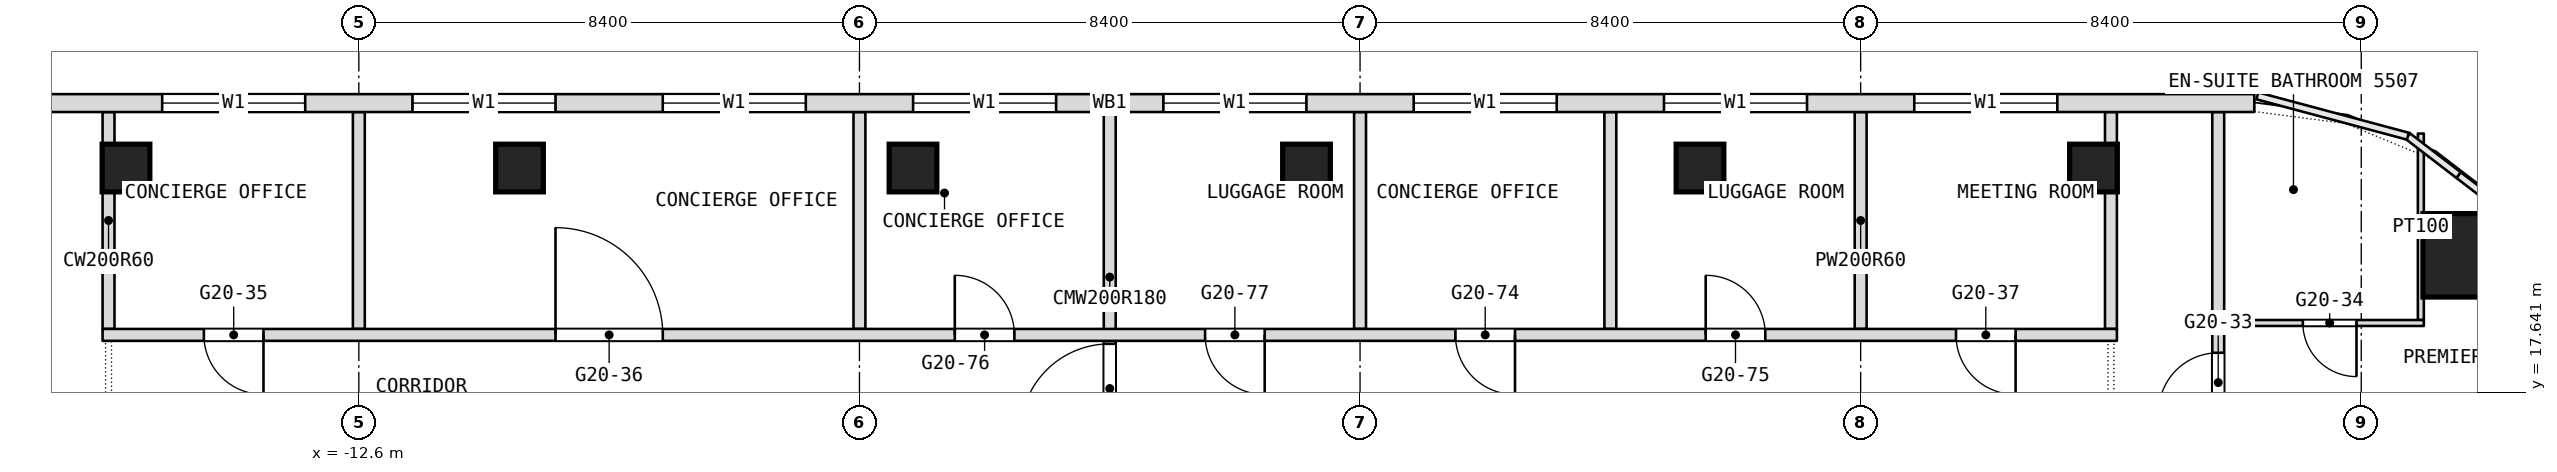
"""IFC4 building model, lengths in metres.
Left out: names, types, materials, properties, quantities, classifications, styles, units other than length and angle.
Written with IfcOpenShell. Run it as: python <this file> out.ifc"""

import sys

from ifc_helpers import new_model, si_unit, direction, frame, frame_2d, origin, origin_2d, place, context, subcontext, project, spatial, rectangle, extrude, element, fill, save


model = new_model("IFC4")
c1 = context("Model", 3, precision=1e-05, world=origin(), true_north=direction((0.0, 1.0)))
c2 = subcontext(c1, "Body", "Model", "MODEL_VIEW")
j1 = project(units=[si_unit("LENGTHUNIT", "METRE"), si_unit("PLANEANGLEUNIT", "RADIAN")], contexts=[c1])
p1 = place(None, origin())
s1 = spatial("IfcSite", under=j1, at=p1, CompositionType="ELEMENT")
p2 = place(p1, origin())
s2 = spatial("IfcBuilding", under=s1, at=p2, CompositionType="ELEMENT")
p3 = place(p2, frame((0.0, 0.0, 234.5)))
s3 = spatial("IfcBuildingStorey", under=s2, at=p3, CompositionType="ELEMENT", Elevation=234.5)
p4 = place(p3, frame((22.736, 19.936, 0.0), z_axis=(0.0, 0.0, 1.0), x_axis=(1.0, 0.0, 0.0)))
e1 = element("IfcColumn", 1, at=p4, inside=s3, PredefinedType="COLUMN", context=c2, shape_type="SweptSolid", body=[
    extrude(rectangle(XDim=1.4, YDim=1.4, at=origin_2d()), origin(), (0.0, 0.0, 1.0), 3.6),
])
for number, where, z_axis, x_axis in (
    (2, (-16.507, 21.4, 0.0), (0.0, 0.0, 1.0), (1.0, 0.0, 0.0)),
    (3, (-9.904, 21.4, 0.0), (0.0, 0.0, 1.0), (1.0, 0.0, 0.0)),
    (4, (-3.302, 21.4, 0.0), (0.0, 0.0, 1.0), (1.0, 0.0, 0.0)),
    (5, (3.302, 21.4, 0.0), (0.0, 0.0, 1.0), (1.0, 0.0, 0.0)),
    (6, (9.904, 21.4, 0.0), (0.0, 0.0, 1.0), (1.0, 0.0, 0.0)),
    (7, (16.507, 21.4, 0.0), (0.0, 0.0, 1.0), (1.0, 0.0, 0.0)),
):
    element("IfcColumn", number, at=place(p3, frame(where, z_axis=z_axis, x_axis=x_axis)), inside=s3, PredefinedType="COLUMN", context=c2, shape_type="SweptSolid", body=[
        extrude(rectangle(XDim=0.8, YDim=0.8, at=origin_2d()), origin(), (0.0, 0.0, 1.0), 3.6),
    ])
p5 = place(p3, frame((22.0, 18.85, 0.0), z_axis=(0.0, 0.0, 1.0), x_axis=(0.0, 1.0, 0.0)))
e8 = element("IfcWall", 8, at=p5, inside=s3, PredefinedType="PARTITIONING", context=c2, shape_type="SweptSolid", body=[
    extrude(rectangle(XDim=3.129, YDim=0.1, at=frame_2d((1.564, 0.0))), origin(), (0.0, 0.0, 1.0), 3.34),
])
p6 = place(p3, frame((18.6, -26.751, 0.0), z_axis=(0.0, 0.0, 1.0), x_axis=(0.0, 1.0, 0.0)))
e9 = element("IfcWall", 9, at=p6, inside=s3, PredefinedType="PARTITIONING", context=c2, shape_type="SweptSolid", body=[
    extrude(rectangle(XDim=49.091, YDim=0.2, at=frame_2d((24.545, 0.0))), origin(), (0.0, 0.0, 1.0), 3.34),
])
p7 = place(p6, frame((6.988, 0.0, 0.0)))
e10 = element("IfcOpeningElement", 10, at=p7, cuts=e9, PredefinedType="OPENING", context=c2, shape_type="SweptSolid", body=[
    extrude(rectangle(XDim=1.1, YDim=2.1, at=frame_2d((0.55, 1.05))), frame((0.0, 0.1, 0.0), z_axis=(0.0, -1.0, 0.0), x_axis=(1.0, 0.0, 0.0)), (0.0, 0.0, 1.0), 0.2),
])
p8 = place(p6, frame((13.551, 0.0, 0.0)))
e11 = element("IfcOpeningElement", 11, at=p8, cuts=e9, PredefinedType="OPENING", context=c2, shape_type="SweptSolid", body=[
    extrude(rectangle(XDim=1.1, YDim=2.1, at=frame_2d((0.55, 1.05))), frame((0.0, 0.1, 0.0), z_axis=(0.0, -1.0, 0.0), x_axis=(1.0, 0.0, 0.0)), (0.0, 0.0, 1.0), 0.2),
])
p9 = place(p6, frame((22.051, 0.0, 0.0)))
e12 = element("IfcOpeningElement", 12, at=p9, cuts=e9, PredefinedType="OPENING", context=c2, shape_type="SweptSolid", body=[
    extrude(rectangle(XDim=1.1, YDim=2.1, at=frame_2d((0.55, 1.05))), frame((0.0, 0.1, 0.0), z_axis=(0.0, -1.0, 0.0), x_axis=(1.0, 0.0, 0.0)), (0.0, 0.0, 1.0), 0.2),
])
p10 = place(p6, frame((28.301, 0.0, 0.0)))
e13 = element("IfcOpeningElement", 13, at=p10, cuts=e9, PredefinedType="OPENING", context=c2, shape_type="SweptSolid", body=[
    extrude(rectangle(XDim=1.1, YDim=2.1, at=frame_2d((0.55, 1.05))), frame((0.0, 0.1, 0.0), z_axis=(0.0, -1.0, 0.0), x_axis=(1.0, 0.0, 0.0)), (0.0, 0.0, 1.0), 0.2),
])
p11 = place(p6, frame((37.951, 0.0, 0.0)))
e14 = element("IfcOpeningElement", 14, at=p11, cuts=e9, PredefinedType="OPENING", context=c2, shape_type="SweptSolid", body=[
    extrude(rectangle(XDim=1.0, YDim=2.1, at=frame_2d((0.5, 1.05))), frame((0.0, 0.1, 0.0), z_axis=(0.0, -1.0, 0.0), x_axis=(1.0, 0.0, 0.0)), (0.0, 0.0, 1.0), 0.2),
])
p12 = place(p6, frame((39.751, 0.0, 0.0)))
e15 = element("IfcOpeningElement", 15, at=p12, cuts=e9, PredefinedType="OPENING", context=c2, shape_type="SweptSolid", body=[
    extrude(rectangle(XDim=1.0, YDim=2.1, at=frame_2d((0.5, 1.05))), frame((0.0, 0.1, 0.0), z_axis=(0.0, -1.0, 0.0), x_axis=(1.0, 0.0, 0.0)), (0.0, 0.0, 1.0), 0.2),
])
p13 = place(p6, frame((44.051, 0.0, 0.0)))
e16 = element("IfcOpeningElement", 16, at=p13, cuts=e9, PredefinedType="OPENING", context=c2, shape_type="SweptSolid", body=[
    extrude(rectangle(XDim=1.0, YDim=2.1, at=frame_2d((0.5, 1.05))), frame((0.0, 0.1, 0.0), z_axis=(0.0, -1.0, 0.0), x_axis=(1.0, 0.0, 0.0)), (0.0, 0.0, 1.0), 0.2),
])
for number, where, z_axis, x_axis in (
    (17, (16.8, 18.7, 0.0), (0.0, 0.0, 1.0), (0.0, 1.0, 0.0)),
    (18, (12.6, 18.7, 0.0), (0.0, 0.0, 1.0), (0.0, 1.0, 0.0)),
    (19, (8.4, 18.7, 0.0), (0.0, 0.0, 1.0), (0.0, 1.0, 0.0)),
    (20, (4.2, 18.7, 0.0), (0.0, 0.0, 1.0), (0.0, 1.0, 0.0)),
):
    element("IfcWall", number, at=place(p3, frame(where, z_axis=z_axis, x_axis=x_axis)), inside=s3, PredefinedType="PARTITIONING", context=c2, shape_type="SweptSolid", body=[
        extrude(rectangle(XDim=3.64, YDim=0.2, at=frame_2d((1.82, 0.0))), origin(), (0.0, 0.0, 1.0), 3.34),
    ])
p14 = place(p3, frame((0.0, 16.8, 0.0), z_axis=(0.0, 0.0, 1.0), x_axis=(0.0, 1.0, 0.0)))
e21 = element("IfcWall", 21, at=p14, inside=s3, PredefinedType="PARTITIONING", context=c2, shape_type="SweptSolid", body=[
    extrude(rectangle(XDim=5.54, YDim=0.2, at=frame_2d((2.77, 0.0))), origin(), (0.0, 0.0, 1.0), 3.34),
])
p15 = place(p14, frame((0.15, 0.0, 0.0)))
e22 = element("IfcOpeningElement", 22, at=p15, cuts=e21, PredefinedType="OPENING", context=c2, shape_type="SweptSolid", body=[
    extrude(rectangle(XDim=1.5, YDim=2.1, at=frame_2d((0.75, 1.05))), frame((0.0, 0.1, 0.0), z_axis=(0.0, -1.0, 0.0), x_axis=(1.0, 0.0, 0.0)), (0.0, 0.0, 1.0), 0.2),
])
for number, where, z_axis, x_axis in (
    (23, (-4.2, 18.7, 0.0), (0.0, 0.0, 1.0), (0.0, 1.0, 0.0)),
    (24, (-12.6, 18.7, 0.0), (0.0, 0.0, 1.0), (0.0, 1.0, 0.0)),
    (25, (-16.8, 18.7, 0.0), (0.0, 0.0, 1.0), (0.0, 1.0, 0.0)),
):
    element("IfcWall", number, at=place(p3, frame(where, z_axis=z_axis, x_axis=x_axis)), inside=s3, PredefinedType="PARTITIONING", context=c2, shape_type="SweptSolid", body=[
        extrude(rectangle(XDim=3.64, YDim=0.2, at=frame_2d((1.82, 0.0))), origin(), (0.0, 0.0, 1.0), 3.34),
    ])
p16 = place(p3, frame((-16.9, 18.6, 0.0), z_axis=(0.0, 0.0, 1.0), x_axis=(1.0, 0.0, 0.0)))
e26 = element("IfcWall", 26, at=p16, inside=s3, PredefinedType="PARTITIONING", context=c2, shape_type="SweptSolid", body=[
    extrude(rectangle(XDim=33.8, YDim=0.2, at=frame_2d((16.9, 0.0))), origin(), (0.0, 0.0, 1.0), 3.34),
])
p17 = place(p16, frame((1.7, 0.0, 0.0)))
e27 = element("IfcOpeningElement", 27, at=p17, cuts=e26, PredefinedType="OPENING", context=c2, shape_type="SweptSolid", body=[
    extrude(rectangle(XDim=1.0, YDim=2.1, at=frame_2d((0.5, 1.05))), frame((0.0, 0.1, 0.0), z_axis=(0.0, -1.0, 0.0), x_axis=(1.0, 0.0, 0.0)), (0.0, 0.0, 1.0), 0.2),
])
p18 = place(p16, frame((7.6, 0.0, 0.0)))
e28 = element("IfcOpeningElement", 28, at=p18, cuts=e26, PredefinedType="OPENING", context=c2, shape_type="SweptSolid", body=[
    extrude(rectangle(XDim=1.8, YDim=2.1, at=frame_2d((0.9, 1.05))), frame((0.0, 0.1, 0.0), z_axis=(0.0, -1.0, 0.0), x_axis=(1.0, 0.0, 0.0)), (0.0, 0.0, 1.0), 0.2),
])
p19 = place(p16, frame((31.1, 0.0, 0.0)))
e29 = element("IfcOpeningElement", 29, at=p19, cuts=e26, PredefinedType="OPENING", context=c2, shape_type="SweptSolid", body=[
    extrude(rectangle(XDim=1.0, YDim=2.1, at=frame_2d((0.5, 1.05))), frame((0.0, 0.1, 0.0), z_axis=(0.0, -1.0, 0.0), x_axis=(1.0, 0.0, 0.0)), (0.0, 0.0, 1.0), 0.2),
])
p20 = place(p16, frame((22.7, 0.0, 0.0)))
e30 = element("IfcOpeningElement", 30, at=p20, cuts=e26, PredefinedType="OPENING", context=c2, shape_type="SweptSolid", body=[
    extrude(rectangle(XDim=1.0, YDim=2.1, at=frame_2d((0.5, 1.05))), frame((0.0, 0.1, 0.0), z_axis=(0.0, -1.0, 0.0), x_axis=(1.0, 0.0, 0.0)), (0.0, 0.0, 1.0), 0.2),
])
p21 = place(p16, frame((26.9, 0.0, 0.0)))
e31 = element("IfcOpeningElement", 31, at=p21, cuts=e26, PredefinedType="OPENING", context=c2, shape_type="SweptSolid", body=[
    extrude(rectangle(XDim=1.0, YDim=2.1, at=frame_2d((0.5, 1.05))), frame((0.0, 0.1, 0.0), z_axis=(0.0, -1.0, 0.0), x_axis=(1.0, 0.0, 0.0)), (0.0, 0.0, 1.0), 0.2),
])
p22 = place(p16, frame((14.3, 0.0, 0.0)))
e32 = element("IfcOpeningElement", 32, at=p22, cuts=e26, PredefinedType="OPENING", context=c2, shape_type="SweptSolid", body=[
    extrude(rectangle(XDim=1.0, YDim=2.1, at=frame_2d((0.5, 1.05))), frame((0.0, 0.1, 0.0), z_axis=(0.0, -1.0, 0.0), x_axis=(1.0, 0.0, 0.0)), (0.0, 0.0, 1.0), 0.2),
])
p23 = place(p16, frame((18.5, 0.0, 0.0)))
e33 = element("IfcOpeningElement", 33, at=p23, cuts=e26, PredefinedType="OPENING", context=c2, shape_type="SweptSolid", body=[
    extrude(rectangle(XDim=1.0, YDim=2.1, at=frame_2d((0.5, 1.05))), frame((0.0, 0.1, 0.0), z_axis=(0.0, -1.0, 0.0), x_axis=(1.0, 0.0, 0.0)), (0.0, 0.0, 1.0), 0.2),
])
p24 = place(p3, frame((18.7, 18.8, 0.0), z_axis=(0.0, 0.0, 1.0), x_axis=(1.0, 0.0, 0.0)))
e34 = element("IfcWall", 34, at=p24, inside=s3, PredefinedType="PARTITIONING", context=c2, shape_type="SweptSolid", body=[
    extrude(rectangle(XDim=3.35, YDim=0.1, at=frame_2d((1.675, 0.0))), origin(), (0.0, 0.0, 1.0), 3.34),
])
p25 = place(p24, frame((1.32, 0.0, 0.0)))
e35 = element("IfcOpeningElement", 35, at=p25, cuts=e34, PredefinedType="OPENING", context=c2, shape_type="SweptSolid", body=[
    extrude(rectangle(XDim=0.9, YDim=2.1, at=frame_2d((0.45, 1.05))), frame((0.0, 0.05, 0.0), z_axis=(0.0, -1.0, 0.0), x_axis=(1.0, 0.0, 0.0)), (0.0, 0.0, 1.0), 0.1),
])
p26 = place(p3, frame((19.206, 22.49, 0.0), z_axis=(0.0, 0.0, 1.0), x_axis=(-1.0, 0.0, 0.0)))
e36 = element("IfcWall", 36, at=p26, inside=s3, PredefinedType="NOTDEFINED", context=c2, shape_type="SweptSolid", body=[
    extrude(rectangle(XDim=38.412, YDim=0.3, at=frame_2d((19.206, 0.0))), origin(), (0.0, 0.0, 1.0), 3.6),
])
p27 = place(p26, frame((3.306, 0.0, 0.9)))
e37 = element("IfcOpeningElement", 37, at=p27, cuts=e36, PredefinedType="OPENING", context=c2, shape_type="SweptSolid", body=[
    extrude(rectangle(XDim=2.4, YDim=2.1, at=frame_2d((1.2, 1.05))), frame((0.0, 0.15, 0.0), z_axis=(0.0, -1.0, 0.0), x_axis=(1.0, 0.0, 0.0)), (0.0, 0.0, 1.0), 0.3),
])
p28 = place(p26, frame((7.506, 0.0, 0.9)))
e38 = element("IfcOpeningElement", 38, at=p28, cuts=e36, PredefinedType="OPENING", context=c2, shape_type="SweptSolid", body=[
    extrude(rectangle(XDim=2.4, YDim=2.1, at=frame_2d((1.2, 1.05))), frame((0.0, 0.15, 0.0), z_axis=(0.0, -1.0, 0.0), x_axis=(1.0, 0.0, 0.0)), (0.0, 0.0, 1.0), 0.3),
])
p29 = place(p26, frame((11.706, 0.0, 0.9)))
e39 = element("IfcOpeningElement", 39, at=p29, cuts=e36, PredefinedType="OPENING", context=c2, shape_type="SweptSolid", body=[
    extrude(rectangle(XDim=2.4, YDim=2.1, at=frame_2d((1.2, 1.05))), frame((0.0, 0.15, 0.0), z_axis=(0.0, -1.0, 0.0), x_axis=(1.0, 0.0, 0.0)), (0.0, 0.0, 1.0), 0.3),
])
p30 = place(p26, frame((15.906, 0.0, 0.9)))
e40 = element("IfcOpeningElement", 40, at=p30, cuts=e36, PredefinedType="OPENING", context=c2, shape_type="SweptSolid", body=[
    extrude(rectangle(XDim=2.4, YDim=2.1, at=frame_2d((1.2, 1.05))), frame((0.0, 0.15, 0.0), z_axis=(0.0, -1.0, 0.0), x_axis=(1.0, 0.0, 0.0)), (0.0, 0.0, 1.0), 0.3),
])
p31 = place(p26, frame((20.106, 0.0, 0.9)))
e41 = element("IfcOpeningElement", 41, at=p31, cuts=e36, PredefinedType="OPENING", context=c2, shape_type="SweptSolid", body=[
    extrude(rectangle(XDim=2.4, YDim=2.1, at=frame_2d((1.2, 1.05))), frame((0.0, 0.15, 0.0), z_axis=(0.0, -1.0, 0.0), x_axis=(1.0, 0.0, 0.0)), (0.0, 0.0, 1.0), 0.3),
])
p32 = place(p26, frame((24.306, 0.0, 0.9)))
e42 = element("IfcOpeningElement", 42, at=p32, cuts=e36, PredefinedType="OPENING", context=c2, shape_type="SweptSolid", body=[
    extrude(rectangle(XDim=2.4, YDim=2.1, at=frame_2d((1.2, 1.05))), frame((0.0, 0.15, 0.0), z_axis=(0.0, -1.0, 0.0), x_axis=(1.0, 0.0, 0.0)), (0.0, 0.0, 1.0), 0.3),
])
p33 = place(p26, frame((28.506, 0.0, 0.9)))
e43 = element("IfcOpeningElement", 43, at=p33, cuts=e36, PredefinedType="OPENING", context=c2, shape_type="SweptSolid", body=[
    extrude(rectangle(XDim=2.4, YDim=2.1, at=frame_2d((1.2, 1.05))), frame((0.0, 0.15, 0.0), z_axis=(0.0, -1.0, 0.0), x_axis=(1.0, 0.0, 0.0)), (0.0, 0.0, 1.0), 0.3),
])
p34 = place(p26, frame((32.706, 0.0, 0.9)))
e44 = element("IfcOpeningElement", 44, at=p34, cuts=e36, PredefinedType="OPENING", context=c2, shape_type="SweptSolid", body=[
    extrude(rectangle(XDim=2.4, YDim=2.1, at=frame_2d((1.2, 1.05))), frame((0.0, 0.15, 0.0), z_axis=(0.0, -1.0, 0.0), x_axis=(1.0, 0.0, 0.0)), (0.0, 0.0, 1.0), 0.3),
])
p35 = place(p13, origin())
e45 = element("IfcDoor", 45, at=p35, inside=s3, OperationType="SINGLE_SWING_LEFT", PredefinedType="DOOR", context=c2, shape_type="SweptSolid", body=[
    extrude(rectangle(XDim=1.0, YDim=2.1, at=frame_2d((0.5, 1.05))), frame((0.0, 0.025, 0.0), z_axis=(0.0, -1.0, 0.0), x_axis=(1.0, 0.0, 0.0)), (0.0, 0.0, 1.0), 0.05),
])
fill(e16, e45)
p36 = place(p17, origin())
e46 = element("IfcDoor", 46, at=p36, inside=s3, OperationType="SINGLE_SWING_LEFT", PredefinedType="DOOR", context=c2, shape_type="SweptSolid", body=[
    extrude(rectangle(XDim=1.0, YDim=2.1, at=frame_2d((0.5, 1.05))), frame((0.0, 0.025, 0.0), z_axis=(0.0, -1.0, 0.0), x_axis=(1.0, 0.0, 0.0)), (0.0, 0.0, 1.0), 0.05),
])
fill(e27, e46)
p37 = place(p18, origin())
e47 = element("IfcDoor", 47, at=p37, inside=s3, OperationType="DOUBLE_DOOR_SINGLE_SWING", PredefinedType="DOOR", context=c2, shape_type="SweptSolid", body=[
    extrude(rectangle(XDim=1.8, YDim=2.1, at=frame_2d((0.9, 1.05))), frame((0.0, 0.025, 0.0), z_axis=(0.0, -1.0, 0.0), x_axis=(1.0, 0.0, 0.0)), (0.0, 0.0, 1.0), 0.05),
])
fill(e28, e47)
p38 = place(p19, origin())
e48 = element("IfcDoor", 48, at=p38, inside=s3, OperationType="SINGLE_SWING_LEFT", PredefinedType="DOOR", context=c2, shape_type="SweptSolid", body=[
    extrude(rectangle(XDim=1.0, YDim=2.1, at=frame_2d((0.5, 1.05))), frame((0.0, 0.025, 0.0), z_axis=(0.0, -1.0, 0.0), x_axis=(1.0, 0.0, 0.0)), (0.0, 0.0, 1.0), 0.05),
])
fill(e29, e48)
p39 = place(p20, origin())
e49 = element("IfcDoor", 49, at=p39, inside=s3, OperationType="SINGLE_SWING_RIGHT", PredefinedType="DOOR", context=c2, shape_type="SweptSolid", body=[
    extrude(rectangle(XDim=1.0, YDim=2.1, at=frame_2d((0.5, 1.05))), frame((0.0, 0.025, 0.0), z_axis=(0.0, -1.0, 0.0), x_axis=(1.0, 0.0, 0.0)), (0.0, 0.0, 1.0), 0.05),
])
fill(e30, e49)
p40 = place(p21, origin())
e50 = element("IfcDoor", 50, at=p40, inside=s3, OperationType="SINGLE_SWING_LEFT", PredefinedType="DOOR", context=c2, shape_type="SweptSolid", body=[
    extrude(rectangle(XDim=1.0, YDim=2.1, at=frame_2d((0.5, 1.05))), frame((0.0, 0.025, 0.0), z_axis=(0.0, -1.0, 0.0), x_axis=(1.0, 0.0, 0.0)), (0.0, 0.0, 1.0), 0.05),
])
fill(e31, e50)
p41 = place(p22, origin())
e51 = element("IfcDoor", 51, at=p41, inside=s3, OperationType="SINGLE_SWING_RIGHT", PredefinedType="DOOR", context=c2, shape_type="SweptSolid", body=[
    extrude(rectangle(XDim=1.0, YDim=2.1, at=frame_2d((0.5, 1.05))), frame((0.0, 0.025, 0.0), z_axis=(0.0, -1.0, 0.0), x_axis=(1.0, 0.0, 0.0)), (0.0, 0.0, 1.0), 0.05),
])
fill(e32, e51)
p42 = place(p23, origin())
e52 = element("IfcDoor", 52, at=p42, inside=s3, OperationType="SINGLE_SWING_LEFT", PredefinedType="DOOR", context=c2, shape_type="SweptSolid", body=[
    extrude(rectangle(XDim=1.0, YDim=2.1, at=frame_2d((0.5, 1.05))), frame((0.0, 0.025, 0.0), z_axis=(0.0, -1.0, 0.0), x_axis=(1.0, 0.0, 0.0)), (0.0, 0.0, 1.0), 0.05),
])
fill(e33, e52)
p43 = place(p25, origin())
e53 = element("IfcDoor", 53, at=p43, inside=s3, OperationType="SINGLE_SWING_RIGHT", PredefinedType="DOOR", context=c2, shape_type="SweptSolid", body=[
    extrude(rectangle(XDim=0.9, YDim=2.1, at=frame_2d((0.45, 1.05))), frame((0.0, 0.025, 0.0), z_axis=(0.0, -1.0, 0.0), x_axis=(1.0, 0.0, 0.0)), (0.0, 0.0, 1.0), 0.05),
])
fill(e35, e53)
p44 = place(p27, origin())
e54 = element("IfcWindow", 54, at=p44, inside=s3, PartitioningType="SINGLE_PANEL", PredefinedType="WINDOW", context=c2, shape_type="SweptSolid", body=[
    extrude(rectangle(XDim=2.4, YDim=2.1, at=frame_2d((1.2, 1.05))), frame((0.0, 0.03, 0.0), z_axis=(0.0, -1.0, 0.0), x_axis=(1.0, 0.0, 0.0)), (0.0, 0.0, 1.0), 0.06),
])
fill(e37, e54)
p45 = place(p28, origin())
e55 = element("IfcWindow", 55, at=p45, inside=s3, PartitioningType="SINGLE_PANEL", PredefinedType="WINDOW", context=c2, shape_type="SweptSolid", body=[
    extrude(rectangle(XDim=2.4, YDim=2.1, at=frame_2d((1.2, 1.05))), frame((0.0, 0.03, 0.0), z_axis=(0.0, -1.0, 0.0), x_axis=(1.0, 0.0, 0.0)), (0.0, 0.0, 1.0), 0.06),
])
fill(e38, e55)
p46 = place(p29, origin())
e56 = element("IfcWindow", 56, at=p46, inside=s3, PartitioningType="SINGLE_PANEL", PredefinedType="WINDOW", context=c2, shape_type="SweptSolid", body=[
    extrude(rectangle(XDim=2.4, YDim=2.1, at=frame_2d((1.2, 1.05))), frame((0.0, 0.03, 0.0), z_axis=(0.0, -1.0, 0.0), x_axis=(1.0, 0.0, 0.0)), (0.0, 0.0, 1.0), 0.06),
])
fill(e39, e56)
p47 = place(p30, origin())
e57 = element("IfcWindow", 57, at=p47, inside=s3, PartitioningType="SINGLE_PANEL", PredefinedType="WINDOW", context=c2, shape_type="SweptSolid", body=[
    extrude(rectangle(XDim=2.4, YDim=2.1, at=frame_2d((1.2, 1.05))), frame((0.0, 0.03, 0.0), z_axis=(0.0, -1.0, 0.0), x_axis=(1.0, 0.0, 0.0)), (0.0, 0.0, 1.0), 0.06),
])
fill(e40, e57)
p48 = place(p31, origin())
e58 = element("IfcWindow", 58, at=p48, inside=s3, PartitioningType="SINGLE_PANEL", PredefinedType="WINDOW", context=c2, shape_type="SweptSolid", body=[
    extrude(rectangle(XDim=2.4, YDim=2.1, at=frame_2d((1.2, 1.05))), frame((0.0, 0.03, 0.0), z_axis=(0.0, -1.0, 0.0), x_axis=(1.0, 0.0, 0.0)), (0.0, 0.0, 1.0), 0.06),
])
fill(e41, e58)
p49 = place(p32, origin())
e59 = element("IfcWindow", 59, at=p49, inside=s3, PartitioningType="SINGLE_PANEL", PredefinedType="WINDOW", context=c2, shape_type="SweptSolid", body=[
    extrude(rectangle(XDim=2.4, YDim=2.1, at=frame_2d((1.2, 1.05))), frame((0.0, 0.03, 0.0), z_axis=(0.0, -1.0, 0.0), x_axis=(1.0, 0.0, 0.0)), (0.0, 0.0, 1.0), 0.06),
])
fill(e42, e59)
p50 = place(p33, origin())
e60 = element("IfcWindow", 60, at=p50, inside=s3, PartitioningType="SINGLE_PANEL", PredefinedType="WINDOW", context=c2, shape_type="SweptSolid", body=[
    extrude(rectangle(XDim=2.4, YDim=2.1, at=frame_2d((1.2, 1.05))), frame((0.0, 0.03, 0.0), z_axis=(0.0, -1.0, 0.0), x_axis=(1.0, 0.0, 0.0)), (0.0, 0.0, 1.0), 0.06),
])
fill(e43, e60)
p51 = place(p34, origin())
e61 = element("IfcWindow", 61, at=p51, inside=s3, PartitioningType="SINGLE_PANEL", PredefinedType="WINDOW", context=c2, shape_type="SweptSolid", body=[
    extrude(rectangle(XDim=2.4, YDim=2.1, at=frame_2d((1.2, 1.05))), frame((0.0, 0.03, 0.0), z_axis=(0.0, -1.0, 0.0), x_axis=(1.0, 0.0, 0.0)), (0.0, 0.0, 1.0), 0.06),
])
fill(e44, e61)
p52 = place(p15, origin())
e62 = element("IfcDoor", 62, at=p52, inside=s3, OperationType="DOUBLE_DOOR_DOUBLE_SWING", PredefinedType="DOOR", context=c2, shape_type="SweptSolid", body=[
    extrude(rectangle(XDim=1.5, YDim=2.1, at=frame_2d((0.75, 1.05))), frame((0.0, 0.025, 0.0), z_axis=(0.0, -1.0, 0.0), x_axis=(1.0, 0.0, 0.0)), (0.0, 0.0, 1.0), 0.05),
])
fill(e22, e62)
save(model, sys.argv[1])
